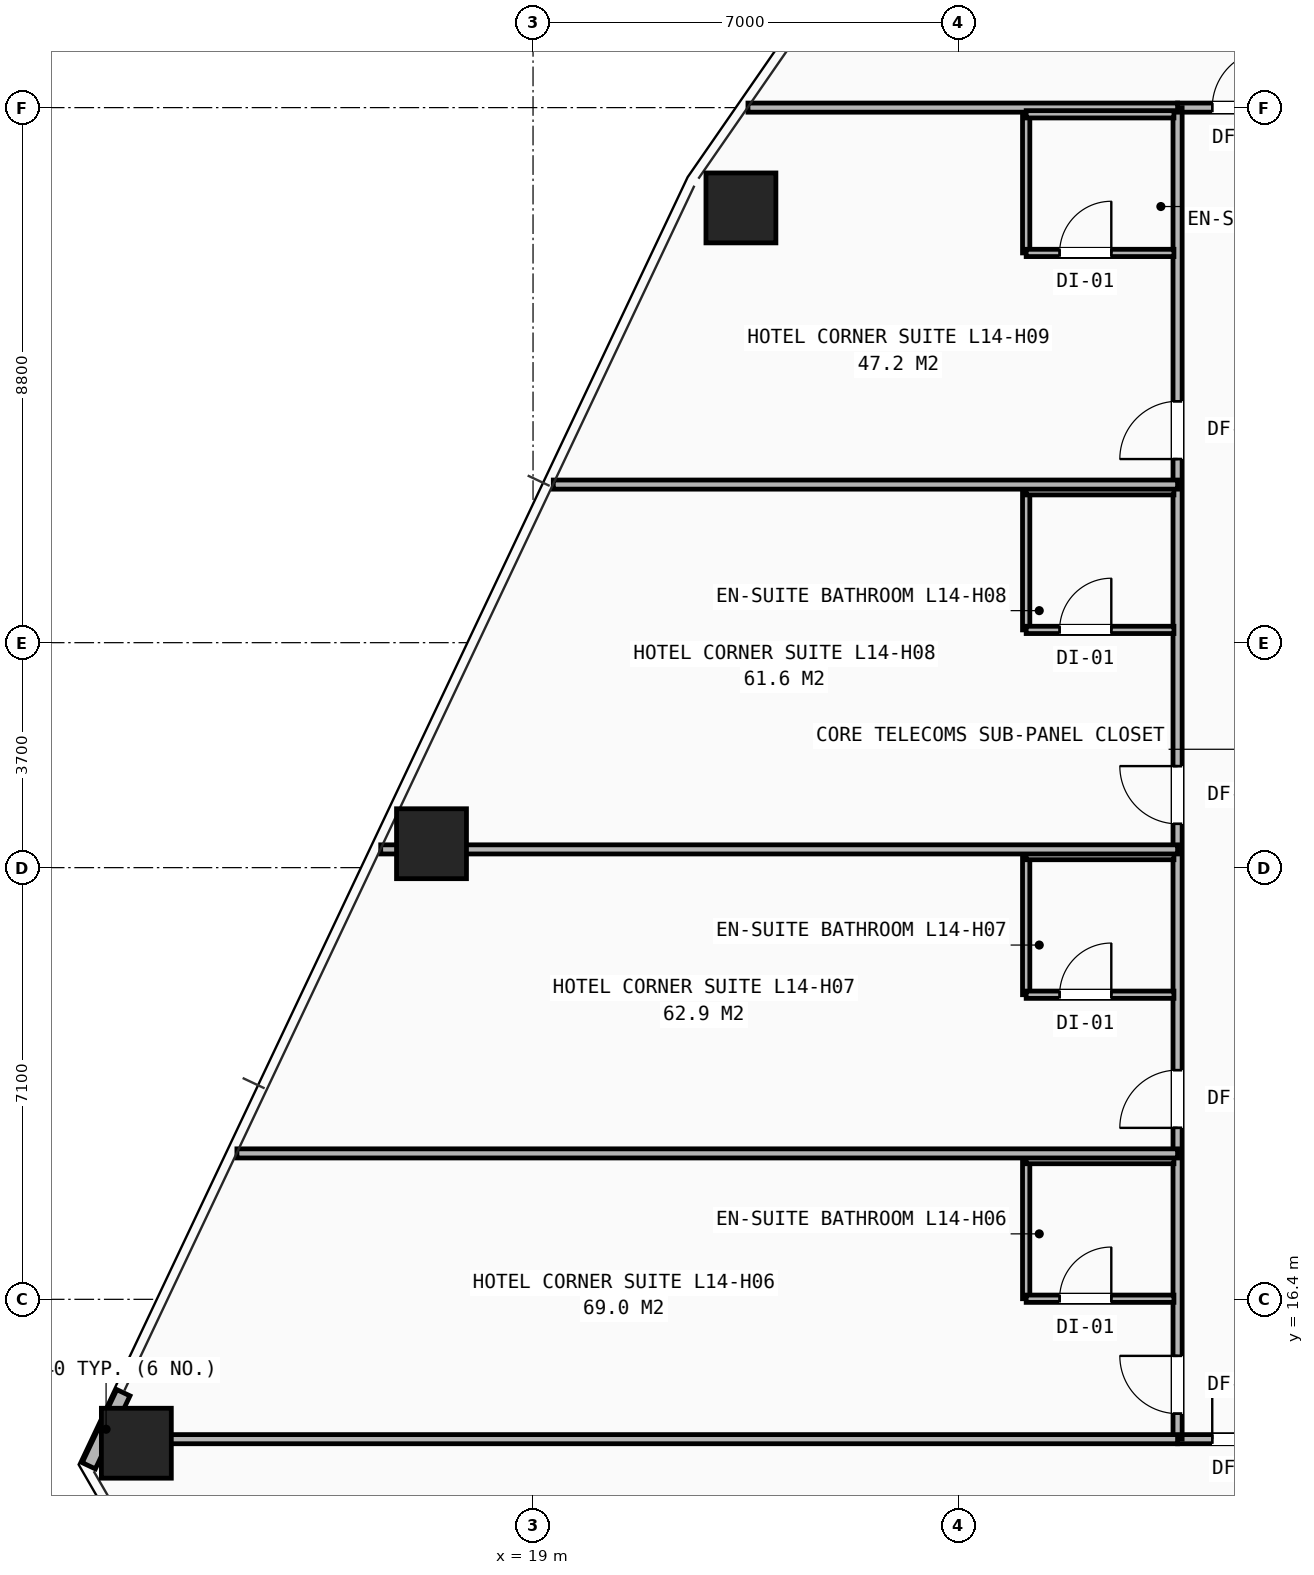
"""IFC4 building model, lengths in metres.
Left out: names, types, materials, properties, quantities, classifications, styles, units other than length and angle.
Written with IfcOpenShell. Run it as: python <this file> out.ifc"""

import sys

from ifc_helpers import new_model, si_unit, direction, frame, frame_2d, origin, origin_2d, place, context, subcontext, project, spatial, rectangle, hollow_rectangle, extrude, element, fill, save


model = new_model("IFC4")
c1 = context("Model", 3, precision=1e-05, world=origin(), true_north=direction((0.0, 1.0)))
c2 = subcontext(c1, "Body", "Model", "MODEL_VIEW")
j1 = project(units=[si_unit("LENGTHUNIT", "METRE"), si_unit("PLANEANGLEUNIT", "RADIAN")], contexts=[c1])
p1 = place(None, origin())
s1 = spatial("IfcSite", under=j1, at=p1, CompositionType="ELEMENT")
p2 = place(p1, origin())
s2 = spatial("IfcBuilding", under=s1, at=p2, CompositionType="ELEMENT")
p3 = place(p2, frame((0.0, 0.0, 52.8)))
s3 = spatial("IfcBuildingStorey", under=s2, at=p3, CompositionType="ELEMENT", Elevation=52.8)
for number, where, z_axis, x_axis in (
    (1, (22.419, 34.35, 0.0), (0.0, 0.0, 1.0), (1.0, 0.0, 0.0)),
    (2, (17.33, 23.893, 0.0), (0.0, 0.0, 1.0), (1.0, 0.0, 0.0)),
    (3, (12.476, 14.033, 0.0), (0.0, 0.0, 1.0), (1.0, 0.0, 0.0)),
):
    element("IfcColumn", number, at=place(p3, frame(where, z_axis=z_axis, x_axis=x_axis)), inside=s3, PredefinedType="COLUMN", context=c2, shape_type="SweptSolid", body=[
        extrude(hollow_rectangle(XDim=1.15, YDim=1.15, WallThickness=0.075, at=origin_2d()), origin(), (0.0, 0.0, 1.0), 3.2),
    ])
p4 = place(p3, frame((12.263, 14.864, 0.0), z_axis=(0.0, 0.0, 1.0), x_axis=(-0.427644283084, -0.903947104175, 0.0)))
e4 = element("IfcWall", 4, at=p4, inside=s3, PredefinedType="SHEAR", context=c2, shape_type="SweptSolid", body=[
    extrude(rectangle(XDim=1.33, YDim=0.24, at=frame_2d((0.665, 0.0))), origin(), (0.0, 0.0, 1.0), 2.263),
])
p5 = place(p3, frame((29.6, 14.1, 0.0), z_axis=(0.0, 0.0, 1.0), x_axis=(1.0, 0.0, 0.0)))
e5 = element("IfcWall", 5, at=p5, inside=s3, PredefinedType="PARTITIONING", context=c2, shape_type="SweptSolid", body=[
    extrude(rectangle(XDim=20.8, YDim=0.15, at=frame_2d((10.4, 0.0))), origin(), (0.0, 0.0, 1.0), 2.191),
])
p6 = place(p5, frame((0.57, 0.0, 0.0)))
e6 = element("IfcOpeningElement", 6, at=p6, cuts=e5, PredefinedType="OPENING", context=c2, shape_type="SweptSolid", body=[
    extrude(rectangle(XDim=0.95, YDim=2.1, at=frame_2d((0.475, 1.05))), frame((0.0, 0.085, 0.0), z_axis=(0.0, -1.0, 0.0), x_axis=(1.0, 0.0, 0.0)), (0.0, 0.0, 1.0), 0.17),
])
p7 = place(p5, frame((4.22, 0.0, 0.0)))
e7 = element("IfcOpeningElement", 7, at=p7, cuts=e5, PredefinedType="OPENING", context=c2, shape_type="SweptSolid", body=[
    extrude(rectangle(XDim=0.95, YDim=2.1, at=frame_2d((0.475, 1.05))), frame((0.0, 0.085, 0.0), z_axis=(0.0, -1.0, 0.0), x_axis=(1.0, 0.0, 0.0)), (0.0, 0.0, 1.0), 0.17),
])
p8 = place(p5, frame((8.42, 0.0, 0.0)))
e8 = element("IfcOpeningElement", 8, at=p8, cuts=e5, PredefinedType="OPENING", context=c2, shape_type="SweptSolid", body=[
    extrude(rectangle(XDim=0.95, YDim=2.1, at=frame_2d((0.475, 1.05))), frame((0.0, 0.085, 0.0), z_axis=(0.0, -1.0, 0.0), x_axis=(1.0, 0.0, 0.0)), (0.0, 0.0, 1.0), 0.17),
])
p9 = place(p5, frame((12.62, 0.0, 0.0)))
e9 = element("IfcOpeningElement", 9, at=p9, cuts=e5, PredefinedType="OPENING", context=c2, shape_type="SweptSolid", body=[
    extrude(rectangle(XDim=0.95, YDim=2.1, at=frame_2d((0.475, 1.05))), frame((0.0, 0.085, 0.0), z_axis=(0.0, -1.0, 0.0), x_axis=(1.0, 0.0, 0.0)), (0.0, 0.0, 1.0), 0.17),
])
p10 = place(p5, frame((17.02, 0.0, 0.0)))
e10 = element("IfcOpeningElement", 10, at=p10, cuts=e5, PredefinedType="OPENING", context=c2, shape_type="SweptSolid", body=[
    extrude(rectangle(XDim=0.95, YDim=2.1, at=frame_2d((0.475, 1.05))), frame((0.0, 0.085, 0.0), z_axis=(0.0, -1.0, 0.0), x_axis=(1.0, 0.0, 0.0)), (0.0, 0.0, 1.0), 0.17),
])
p11 = place(p3, frame((29.6, 36.0, 0.0), z_axis=(0.0, 0.0, 1.0), x_axis=(1.0, 0.0, 0.0)))
e11 = element("IfcWall", 11, at=p11, inside=s3, PredefinedType="PARTITIONING", context=c2, shape_type="SweptSolid", body=[
    extrude(rectangle(XDim=10.175, YDim=0.15, at=frame_2d((5.087, 0.0))), origin(), (0.0, 0.0, 1.0), 2.98),
])
p12 = place(p11, frame((0.57, 0.0, 0.0)))
e12 = element("IfcOpeningElement", 12, at=p12, cuts=e11, PredefinedType="OPENING", context=c2, shape_type="SweptSolid", body=[
    extrude(rectangle(XDim=0.95, YDim=2.1, at=frame_2d((0.475, 1.05))), frame((0.0, 0.085, 0.0), z_axis=(0.0, -1.0, 0.0), x_axis=(1.0, 0.0, 0.0)), (0.0, 0.0, 1.0), 0.17),
])
p13 = place(p11, frame((5.62, 0.0, 0.0)))
e13 = element("IfcOpeningElement", 13, at=p13, cuts=e11, PredefinedType="OPENING", context=c2, shape_type="SweptSolid", body=[
    extrude(rectangle(XDim=0.95, YDim=2.1, at=frame_2d((0.475, 1.05))), frame((0.0, 0.085, 0.0), z_axis=(0.0, -1.0, 0.0), x_axis=(1.0, 0.0, 0.0)), (0.0, 0.0, 1.0), 0.17),
])
p14 = place(p3, frame((29.6, 14.1, 0.0), z_axis=(0.0, 0.0, 1.0), x_axis=(0.0, 1.0, 0.0)))
e14 = element("IfcWall", 14, at=p14, inside=s3, PredefinedType="PARTITIONING", context=c2, shape_type="SweptSolid", body=[
    extrude(rectangle(XDim=21.9, YDim=0.15, at=frame_2d((10.95, 0.0))), origin(), (0.0, 0.0, 1.0), 2.191),
])
p15 = place(p14, frame((0.42, 0.0, 0.0)))
e15 = element("IfcOpeningElement", 15, at=p15, cuts=e14, PredefinedType="OPENING", context=c2, shape_type="SweptSolid", body=[
    extrude(rectangle(XDim=0.95, YDim=2.1, at=frame_2d((0.475, 1.05))), frame((0.0, 0.085, 0.0), z_axis=(0.0, -1.0, 0.0), x_axis=(1.0, 0.0, 0.0)), (0.0, 0.0, 1.0), 0.17),
])
p16 = place(p14, frame((5.12, 0.0, 0.0)))
e16 = element("IfcOpeningElement", 16, at=p16, cuts=e14, PredefinedType="OPENING", context=c2, shape_type="SweptSolid", body=[
    extrude(rectangle(XDim=0.95, YDim=2.1, at=frame_2d((0.475, 1.05))), frame((0.0, 0.085, 0.0), z_axis=(0.0, -1.0, 0.0), x_axis=(1.0, 0.0, 0.0)), (0.0, 0.0, 1.0), 0.17),
])
p17 = place(p14, frame((10.12, 0.0, 0.0)))
e17 = element("IfcOpeningElement", 17, at=p17, cuts=e14, PredefinedType="OPENING", context=c2, shape_type="SweptSolid", body=[
    extrude(rectangle(XDim=0.95, YDim=2.1, at=frame_2d((0.475, 1.05))), frame((0.0, 0.085, 0.0), z_axis=(0.0, -1.0, 0.0), x_axis=(1.0, 0.0, 0.0)), (0.0, 0.0, 1.0), 0.17),
])
p18 = place(p14, frame((16.12, 0.0, 0.0)))
e18 = element("IfcOpeningElement", 18, at=p18, cuts=e14, PredefinedType="OPENING", context=c2, shape_type="SweptSolid", body=[
    extrude(rectangle(XDim=0.95, YDim=2.1, at=frame_2d((0.475, 1.05))), frame((0.0, 0.085, 0.0), z_axis=(0.0, -1.0, 0.0), x_axis=(1.0, 0.0, 0.0)), (0.0, 0.0, 1.0), 0.17),
])
p19 = place(p3, frame((11.906, 14.1, 0.0), z_axis=(0.0, 0.0, 1.0), x_axis=(1.0, 0.0, 0.0)))
e19 = element("IfcWall", 19, at=p19, inside=s3, PredefinedType="PARTITIONING", context=c2, shape_type="SweptSolid", body=[
    extrude(rectangle(XDim=17.694, YDim=0.15, at=frame_2d((8.847, 0.0))), origin(), (0.0, 0.0, 1.0), 2.191),
])
p20 = place(p3, frame((22.535, 36.0, 0.0), z_axis=(0.0, 0.0, 1.0), x_axis=(1.0, 0.0, 0.0)))
e20 = element("IfcWall", 20, at=p20, inside=s3, PredefinedType="PARTITIONING", context=c2, shape_type="SweptSolid", body=[
    extrude(rectangle(XDim=7.065, YDim=0.15, at=frame_2d((3.533, 0.0))), origin(), (0.0, 0.0, 1.0), 2.268),
])
p21 = place(p3, frame((27.11, 16.41, 0.0), z_axis=(0.0, 0.0, 1.0), x_axis=(0.0, 1.0, 0.0)))
e21 = element("IfcWall", 21, at=p21, inside=s3, PredefinedType="PARTITIONING", context=c2, shape_type="SweptSolid", body=[
    extrude(rectangle(XDim=2.28, YDim=0.12, at=frame_2d((1.14, 0.0))), origin(), (0.0, 0.0, 1.0), 2.98),
])
p22 = place(p3, frame((27.11, 16.41, 0.0), z_axis=(0.0, 0.0, 1.0), x_axis=(1.0, 0.0, 0.0)))
e22 = element("IfcWall", 22, at=p22, inside=s3, PredefinedType="PARTITIONING", context=c2, shape_type="SweptSolid", body=[
    extrude(rectangle(XDim=2.43, YDim=0.12, at=frame_2d((1.215, 0.0))), origin(), (0.0, 0.0, 1.0), 2.98),
])
p23 = place(p22, frame((0.55, 0.0, 0.0)))
e23 = element("IfcOpeningElement", 23, at=p23, cuts=e22, PredefinedType="OPENING", context=c2, shape_type="SweptSolid", body=[
    extrude(rectangle(XDim=0.85, YDim=2.05, at=frame_2d((0.425, 1.025))), frame((0.0, 0.07, 0.0), z_axis=(0.0, -1.0, 0.0), x_axis=(1.0, 0.0, 0.0)), (0.0, 0.0, 1.0), 0.14),
])
p24 = place(p3, frame((27.11, 18.69, 0.0), z_axis=(0.0, 0.0, 1.0), x_axis=(1.0, 0.0, 0.0)))
e24 = element("IfcWall", 24, at=p24, inside=s3, PredefinedType="PARTITIONING", context=c2, shape_type="SweptSolid", body=[
    extrude(rectangle(XDim=2.43, YDim=0.12, at=frame_2d((1.215, 0.0))), origin(), (0.0, 0.0, 1.0), 2.98),
])
p25 = place(p3, frame((14.13, 18.8, 0.0), z_axis=(0.0, 0.0, 1.0), x_axis=(1.0, 0.0, 0.0)))
e25 = element("IfcWall", 25, at=p25, inside=s3, PredefinedType="PARTITIONING", context=c2, shape_type="SweptSolid", body=[
    extrude(rectangle(XDim=15.47, YDim=0.15, at=frame_2d((7.735, 0.0))), origin(), (0.0, 0.0, 1.0), 2.268),
])
p26 = place(p3, frame((27.11, 21.41, 0.0), z_axis=(0.0, 0.0, 1.0), x_axis=(0.0, 1.0, 0.0)))
e26 = element("IfcWall", 26, at=p26, inside=s3, PredefinedType="PARTITIONING", context=c2, shape_type="SweptSolid", body=[
    extrude(rectangle(XDim=2.28, YDim=0.12, at=frame_2d((1.14, 0.0))), origin(), (0.0, 0.0, 1.0), 2.98),
])
p27 = place(p3, frame((27.11, 21.41, 0.0), z_axis=(0.0, 0.0, 1.0), x_axis=(1.0, 0.0, 0.0)))
e27 = element("IfcWall", 27, at=p27, inside=s3, PredefinedType="PARTITIONING", context=c2, shape_type="SweptSolid", body=[
    extrude(rectangle(XDim=2.43, YDim=0.12, at=frame_2d((1.215, 0.0))), origin(), (0.0, 0.0, 1.0), 2.98),
])
p28 = place(p27, frame((0.55, 0.0, 0.0)))
e28 = element("IfcOpeningElement", 28, at=p28, cuts=e27, PredefinedType="OPENING", context=c2, shape_type="SweptSolid", body=[
    extrude(rectangle(XDim=0.85, YDim=2.05, at=frame_2d((0.425, 1.025))), frame((0.0, 0.07, 0.0), z_axis=(0.0, -1.0, 0.0), x_axis=(1.0, 0.0, 0.0)), (0.0, 0.0, 1.0), 0.14),
])
p29 = place(p3, frame((27.11, 23.69, 0.0), z_axis=(0.0, 0.0, 1.0), x_axis=(1.0, 0.0, 0.0)))
e29 = element("IfcWall", 29, at=p29, inside=s3, PredefinedType="PARTITIONING", context=c2, shape_type="SweptSolid", body=[
    extrude(rectangle(XDim=2.43, YDim=0.12, at=frame_2d((1.215, 0.0))), origin(), (0.0, 0.0, 1.0), 2.98),
])
p30 = place(p3, frame((16.495, 23.8, 0.0), z_axis=(0.0, 0.0, 1.0), x_axis=(1.0, 0.0, 0.0)))
e30 = element("IfcWall", 30, at=p30, inside=s3, PredefinedType="PARTITIONING", context=c2, shape_type="SweptSolid", body=[
    extrude(rectangle(XDim=13.105, YDim=0.15, at=frame_2d((6.552, 0.0))), origin(), (0.0, 0.0, 1.0), 2.268),
])
p31 = place(p3, frame((27.11, 27.41, 0.0), z_axis=(0.0, 0.0, 1.0), x_axis=(0.0, 1.0, 0.0)))
e31 = element("IfcWall", 31, at=p31, inside=s3, PredefinedType="PARTITIONING", context=c2, shape_type="SweptSolid", body=[
    extrude(rectangle(XDim=2.28, YDim=0.12, at=frame_2d((1.14, 0.0))), origin(), (0.0, 0.0, 1.0), 2.98),
])
p32 = place(p3, frame((27.11, 27.41, 0.0), z_axis=(0.0, 0.0, 1.0), x_axis=(1.0, 0.0, 0.0)))
e32 = element("IfcWall", 32, at=p32, inside=s3, PredefinedType="PARTITIONING", context=c2, shape_type="SweptSolid", body=[
    extrude(rectangle(XDim=2.43, YDim=0.12, at=frame_2d((1.215, 0.0))), origin(), (0.0, 0.0, 1.0), 2.98),
])
p33 = place(p32, frame((0.55, 0.0, 0.0)))
e33 = element("IfcOpeningElement", 33, at=p33, cuts=e32, PredefinedType="OPENING", context=c2, shape_type="SweptSolid", body=[
    extrude(rectangle(XDim=0.85, YDim=2.05, at=frame_2d((0.425, 1.025))), frame((0.0, 0.07, 0.0), z_axis=(0.0, -1.0, 0.0), x_axis=(1.0, 0.0, 0.0)), (0.0, 0.0, 1.0), 0.14),
])
p34 = place(p3, frame((27.11, 29.69, 0.0), z_axis=(0.0, 0.0, 1.0), x_axis=(1.0, 0.0, 0.0)))
e34 = element("IfcWall", 34, at=p34, inside=s3, PredefinedType="PARTITIONING", context=c2, shape_type="SweptSolid", body=[
    extrude(rectangle(XDim=2.43, YDim=0.12, at=frame_2d((1.215, 0.0))), origin(), (0.0, 0.0, 1.0), 2.98),
])
p35 = place(p3, frame((19.333, 29.8, 0.0), z_axis=(0.0, 0.0, 1.0), x_axis=(1.0, 0.0, 0.0)))
e35 = element("IfcWall", 35, at=p35, inside=s3, PredefinedType="PARTITIONING", context=c2, shape_type="SweptSolid", body=[
    extrude(rectangle(XDim=10.267, YDim=0.15, at=frame_2d((5.133, 0.0))), origin(), (0.0, 0.0, 1.0), 2.268),
])
p36 = place(p3, frame((27.11, 33.61, 0.0), z_axis=(0.0, 0.0, 1.0), x_axis=(0.0, 1.0, 0.0)))
e36 = element("IfcWall", 36, at=p36, inside=s3, PredefinedType="PARTITIONING", context=c2, shape_type="SweptSolid", body=[
    extrude(rectangle(XDim=2.28, YDim=0.12, at=frame_2d((1.14, 0.0))), origin(), (0.0, 0.0, 1.0), 2.513),
])
p37 = place(p3, frame((27.11, 33.61, 0.0), z_axis=(0.0, 0.0, 1.0), x_axis=(1.0, 0.0, 0.0)))
e37 = element("IfcWall", 37, at=p37, inside=s3, PredefinedType="PARTITIONING", context=c2, shape_type="SweptSolid", body=[
    extrude(rectangle(XDim=2.43, YDim=0.12, at=frame_2d((1.215, 0.0))), origin(), (0.0, 0.0, 1.0), 2.513),
])
p38 = place(p37, frame((0.55, 0.0, 0.0)))
e38 = element("IfcOpeningElement", 38, at=p38, cuts=e37, PredefinedType="OPENING", context=c2, shape_type="SweptSolid", body=[
    extrude(rectangle(XDim=0.85, YDim=2.05, at=frame_2d((0.425, 1.025))), frame((0.0, 0.07, 0.0), z_axis=(0.0, -1.0, 0.0), x_axis=(1.0, 0.0, 0.0)), (0.0, 0.0, 1.0), 0.14),
])
p39 = place(p3, frame((27.11, 35.89, 0.0), z_axis=(0.0, 0.0, 1.0), x_axis=(1.0, 0.0, 0.0)))
e39 = element("IfcWall", 39, at=p39, inside=s3, PredefinedType="PARTITIONING", context=c2, shape_type="SweptSolid", body=[
    extrude(rectangle(XDim=2.43, YDim=0.12, at=frame_2d((1.215, 0.0))), origin(), (0.0, 0.0, 1.0), 2.513),
])
p40 = place(p6, origin())
e40 = element("IfcDoor", 40, at=p40, inside=s3, OperationType="SINGLE_SWING_LEFT", PredefinedType="DOOR", context=c2, shape_type="SweptSolid", body=[
    extrude(rectangle(XDim=0.95, YDim=2.1, at=frame_2d((0.475, 1.05))), frame((0.0, 0.025, 0.0), z_axis=(0.0, -1.0, 0.0), x_axis=(1.0, 0.0, 0.0)), (0.0, 0.0, 1.0), 0.05),
])
fill(e6, e40)
p41 = place(p15, origin())
e41 = element("IfcDoor", 41, at=p41, inside=s3, OperationType="SINGLE_SWING_RIGHT", PredefinedType="DOOR", context=c2, shape_type="SweptSolid", body=[
    extrude(rectangle(XDim=0.95, YDim=2.1, at=frame_2d((0.475, 1.05))), frame((0.0, 0.025, 0.0), z_axis=(0.0, -1.0, 0.0), x_axis=(1.0, 0.0, 0.0)), (0.0, 0.0, 1.0), 0.05),
])
fill(e15, e41)
p42 = place(p23, origin())
e42 = element("IfcDoor", 42, at=p42, inside=s3, OperationType="SINGLE_SWING_RIGHT", PredefinedType="DOOR", context=c2, shape_type="SweptSolid", body=[
    extrude(rectangle(XDim=0.85, YDim=2.05, at=frame_2d((0.425, 1.025))), frame((0.0, 0.025, 0.0), z_axis=(0.0, -1.0, 0.0), x_axis=(1.0, 0.0, 0.0)), (0.0, 0.0, 1.0), 0.05),
])
fill(e23, e42)
p43 = place(p16, origin())
e43 = element("IfcDoor", 43, at=p43, inside=s3, OperationType="SINGLE_SWING_LEFT", PredefinedType="DOOR", context=c2, shape_type="SweptSolid", body=[
    extrude(rectangle(XDim=0.95, YDim=2.1, at=frame_2d((0.475, 1.05))), frame((0.0, 0.025, 0.0), z_axis=(0.0, -1.0, 0.0), x_axis=(1.0, 0.0, 0.0)), (0.0, 0.0, 1.0), 0.05),
])
fill(e16, e43)
p44 = place(p28, origin())
e44 = element("IfcDoor", 44, at=p44, inside=s3, OperationType="SINGLE_SWING_RIGHT", PredefinedType="DOOR", context=c2, shape_type="SweptSolid", body=[
    extrude(rectangle(XDim=0.85, YDim=2.05, at=frame_2d((0.425, 1.025))), frame((0.0, 0.025, 0.0), z_axis=(0.0, -1.0, 0.0), x_axis=(1.0, 0.0, 0.0)), (0.0, 0.0, 1.0), 0.05),
])
fill(e28, e44)
p45 = place(p17, origin())
e45 = element("IfcDoor", 45, at=p45, inside=s3, OperationType="SINGLE_SWING_RIGHT", PredefinedType="DOOR", context=c2, shape_type="SweptSolid", body=[
    extrude(rectangle(XDim=0.95, YDim=2.1, at=frame_2d((0.475, 1.05))), frame((0.0, 0.025, 0.0), z_axis=(0.0, -1.0, 0.0), x_axis=(1.0, 0.0, 0.0)), (0.0, 0.0, 1.0), 0.05),
])
fill(e17, e45)
p46 = place(p33, origin())
e46 = element("IfcDoor", 46, at=p46, inside=s3, OperationType="SINGLE_SWING_RIGHT", PredefinedType="DOOR", context=c2, shape_type="SweptSolid", body=[
    extrude(rectangle(XDim=0.85, YDim=2.05, at=frame_2d((0.425, 1.025))), frame((0.0, 0.025, 0.0), z_axis=(0.0, -1.0, 0.0), x_axis=(1.0, 0.0, 0.0)), (0.0, 0.0, 1.0), 0.05),
])
fill(e33, e46)
p47 = place(p18, origin())
e47 = element("IfcDoor", 47, at=p47, inside=s3, OperationType="SINGLE_SWING_LEFT", PredefinedType="DOOR", context=c2, shape_type="SweptSolid", body=[
    extrude(rectangle(XDim=0.95, YDim=2.1, at=frame_2d((0.475, 1.05))), frame((0.0, 0.025, 0.0), z_axis=(0.0, -1.0, 0.0), x_axis=(1.0, 0.0, 0.0)), (0.0, 0.0, 1.0), 0.05),
])
fill(e18, e47)
p48 = place(p38, origin())
e48 = element("IfcDoor", 48, at=p48, inside=s3, OperationType="SINGLE_SWING_RIGHT", PredefinedType="DOOR", context=c2, shape_type="SweptSolid", body=[
    extrude(rectangle(XDim=0.85, YDim=2.05, at=frame_2d((0.425, 1.025))), frame((0.0, 0.025, 0.0), z_axis=(0.0, -1.0, 0.0), x_axis=(1.0, 0.0, 0.0)), (0.0, 0.0, 1.0), 0.05),
])
fill(e38, e48)
p49 = place(p12, origin())
e49 = element("IfcDoor", 49, at=p49, inside=s3, OperationType="SINGLE_SWING_RIGHT", PredefinedType="DOOR", context=c2, shape_type="SweptSolid", body=[
    extrude(rectangle(XDim=0.95, YDim=2.1, at=frame_2d((0.475, 1.05))), frame((0.0, 0.025, 0.0), z_axis=(0.0, -1.0, 0.0), x_axis=(1.0, 0.0, 0.0)), (0.0, 0.0, 1.0), 0.05),
])
fill(e12, e49)
save(model, sys.argv[1])
